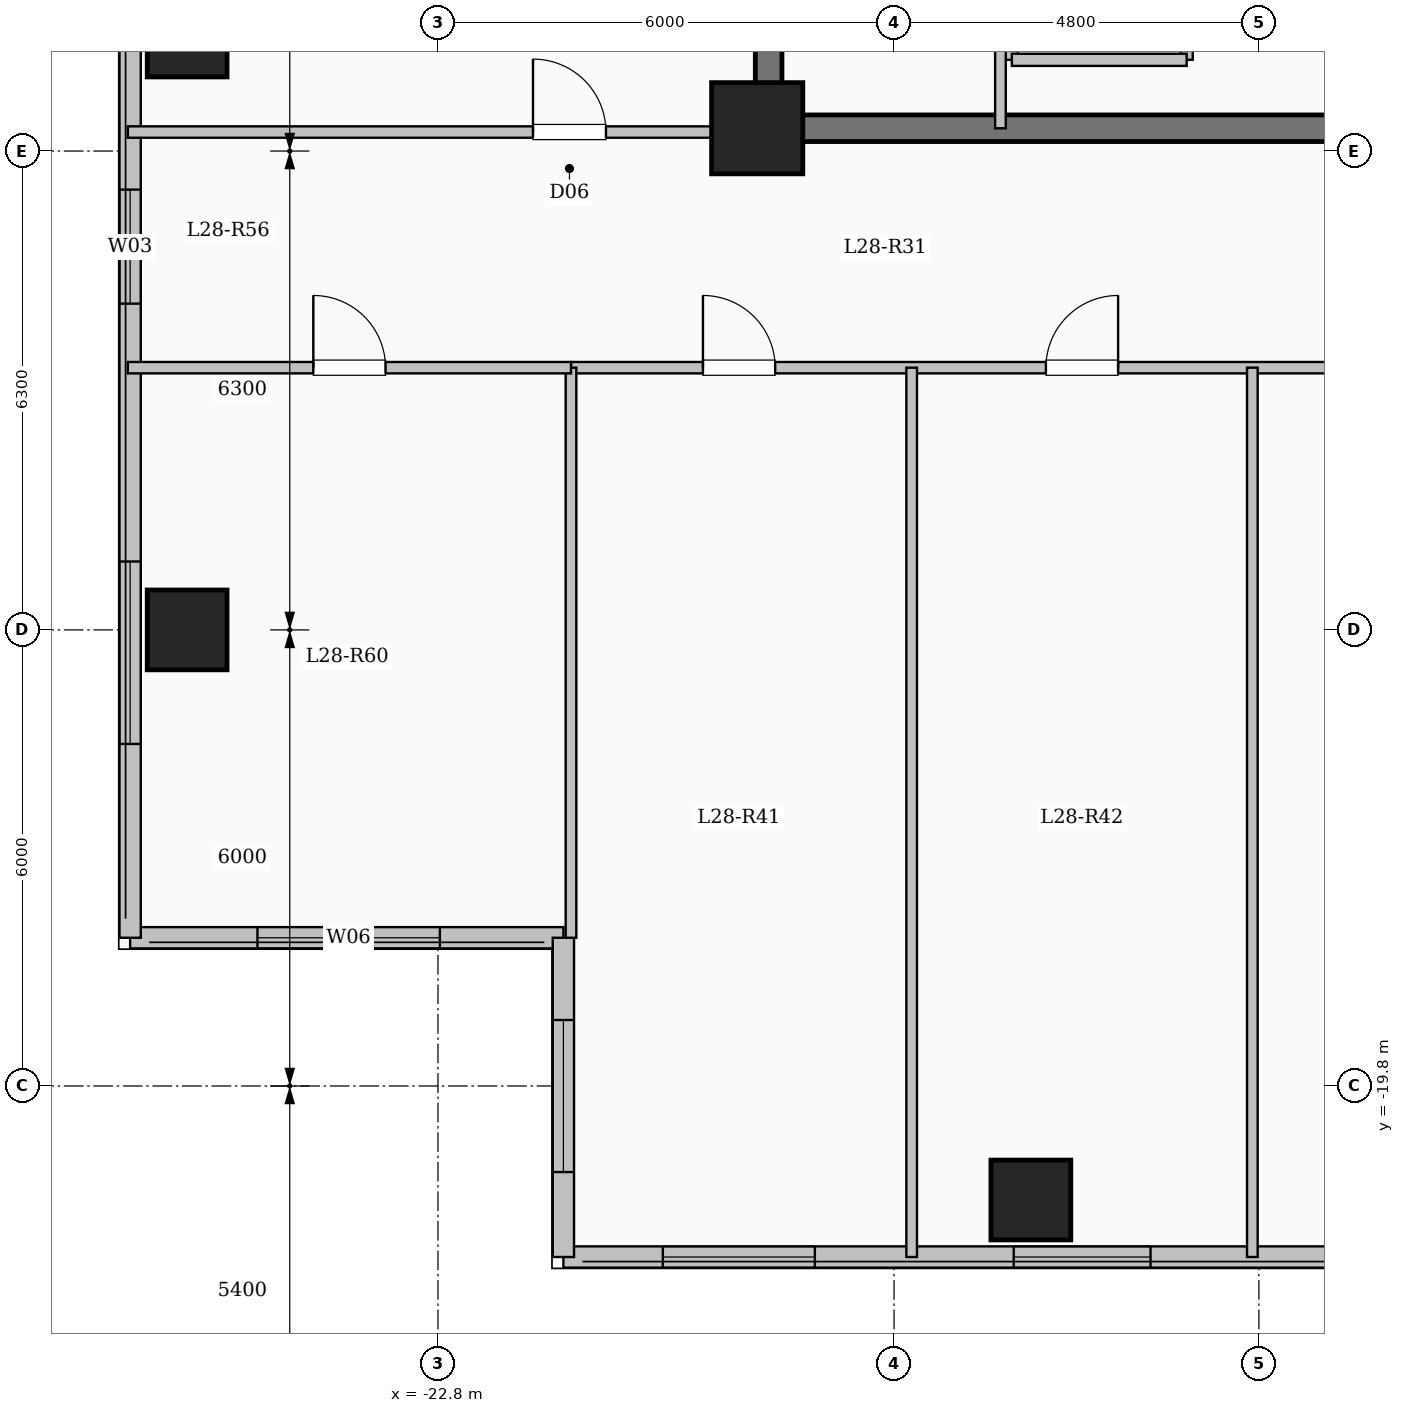
"""IFC4 building model, lengths in metres.
Left out: names, types, materials, properties, quantities, classifications, styles, units other than length and angle.
Written with IfcOpenShell. Run it as: python <this file> out.ifc"""

import sys

from ifc_helpers import new_model, si_unit, direction, frame, frame_2d, origin, origin_2d, place, context, subcontext, project, spatial, rectangle, extrude, element, fill, save


model = new_model("IFC4")
c1 = context("Model", 3, precision=1e-05, world=origin(), true_north=direction((0.0, 1.0)))
c2 = subcontext(c1, "Body", "Model", "MODEL_VIEW")
j1 = project(units=[si_unit("LENGTHUNIT", "METRE"), si_unit("PLANEANGLEUNIT", "RADIAN")], contexts=[c1])
p1 = place(None, origin())
s1 = spatial("IfcSite", under=j1, at=p1, CompositionType="ELEMENT")
p2 = place(p1, origin())
s2 = spatial("IfcBuilding", under=s1, at=p2, CompositionType="ELEMENT")
p3 = place(p2, frame((0.0, 0.0, 105.1)))
s3 = spatial("IfcBuildingStorey", under=s2, at=p3, CompositionType="ELEMENT", Elevation=105.1)
p4 = place(p3, frame((-18.6, -7.2, 0.0), z_axis=(0.0, 0.0, 1.0), x_axis=(1.0, 0.0, 0.0)))
e1 = element("IfcColumn", 1, at=p4, inside=s3, PredefinedType="COLUMN", context=c2, shape_type="SweptSolid", body=[
    extrude(rectangle(XDim=1.2, YDim=1.2, at=origin_2d()), origin(), (0.0, 0.0, 1.0), 3.35),
])
for number, where, z_axis, x_axis in (
    (2, (-15.0, -21.3, 0.0), (0.0, 0.0, 1.0), (1.0, 0.0, 0.0)),
    (3, (-26.1, -13.8, 0.0), (0.0, 0.0, 1.0), (1.0, 0.0, 0.0)),
    (4, (-26.1, -6.0, 0.0), (0.0, 0.0, 1.0), (1.0, 0.0, 0.0)),
):
    element("IfcColumn", number, at=place(p3, frame(where, z_axis=z_axis, x_axis=x_axis)), inside=s3, PredefinedType="COLUMN", context=c2, shape_type="SweptSolid", body=[
        extrude(rectangle(XDim=1.05, YDim=1.05, at=origin_2d()), origin(), (0.0, 0.0, 1.0), 3.35),
    ])
p5 = place(p3, frame((-21.15, -17.85, 0.0), z_axis=(0.0, 0.0, 1.0), x_axis=(-1.0, 0.0, 0.0)))
e5 = element("IfcWall", 5, at=p5, inside=s3, PredefinedType="SOLIDWALL", context=c2, shape_type="SweptSolid", body=[
    extrude(rectangle(XDim=5.7, YDim=0.28, at=frame_2d((2.85, 0.0))), origin(), (0.0, 0.0, 1.0), 3.1),
])
p6 = place(p5, frame((1.625, 0.0, 0.9)))
e6 = element("IfcOpeningElement", 6, at=p6, cuts=e5, PredefinedType="OPENING", context=c2, shape_type="SweptSolid", body=[
    extrude(rectangle(XDim=2.4, YDim=1.8, at=frame_2d((1.2, 0.9))), frame((0.0, 0.15, 0.0), z_axis=(0.0, -1.0, 0.0), x_axis=(1.0, 0.0, 0.0)), (0.0, 0.0, 1.0), 0.3),
])
p7 = place(p3, frame((-26.85, -17.85, 0.0), z_axis=(0.0, 0.0, 1.0), x_axis=(0.0, 1.0, 0.0)))
e7 = element("IfcWall", 7, at=p7, inside=s3, PredefinedType="SOLIDWALL", context=c2, shape_type="SweptSolid", body=[
    extrude(rectangle(XDim=35.7, YDim=0.28, at=frame_2d((17.85, 0.0))), origin(), (0.0, 0.0, 1.0), 3.1),
])
p8 = place(p7, frame((2.55, 0.0, 0.9)))
e8 = element("IfcOpeningElement", 8, at=p8, cuts=e7, PredefinedType="OPENING", context=c2, shape_type="SweptSolid", body=[
    extrude(rectangle(XDim=2.4, YDim=1.8, at=frame_2d((1.2, 0.9))), frame((0.0, 0.15, 0.0), z_axis=(0.0, -1.0, 0.0), x_axis=(1.0, 0.0, 0.0)), (0.0, 0.0, 1.0), 0.3),
])
p9 = place(p7, frame((8.343, 0.0, 0.9)))
e9 = element("IfcOpeningElement", 9, at=p9, cuts=e7, PredefinedType="OPENING", context=c2, shape_type="SweptSolid", body=[
    extrude(rectangle(XDim=1.5, YDim=1.65, at=frame_2d((0.75, 0.825))), frame((0.0, 0.15, 0.0), z_axis=(0.0, -1.0, 0.0), x_axis=(1.0, 0.0, 0.0)), (0.0, 0.0, 1.0), 0.3),
])
p10 = place(p7, frame((13.75, 0.0, 0.9)))
e10 = element("IfcOpeningElement", 10, at=p10, cuts=e7, PredefinedType="OPENING", context=c2, shape_type="SweptSolid", body=[
    extrude(rectangle(XDim=2.4, YDim=1.8, at=frame_2d((1.2, 0.9))), frame((0.0, 0.15, 0.0), z_axis=(0.0, -1.0, 0.0), x_axis=(1.0, 0.0, 0.0)), (0.0, 0.0, 1.0), 0.3),
])
p11 = place(p7, frame((20.175, 0.0, 0.9)))
e11 = element("IfcOpeningElement", 11, at=p11, cuts=e7, PredefinedType="OPENING", context=c2, shape_type="SweptSolid", body=[
    extrude(rectangle(XDim=1.8, YDim=1.65, at=frame_2d((0.9, 0.825))), frame((0.0, 0.15, 0.0), z_axis=(0.0, -1.0, 0.0), x_axis=(1.0, 0.0, 0.0)), (0.0, 0.0, 1.0), 0.3),
])
p12 = place(p7, frame((24.725, 0.0, 0.9)))
e12 = element("IfcOpeningElement", 12, at=p12, cuts=e7, PredefinedType="OPENING", context=c2, shape_type="SweptSolid", body=[
    extrude(rectangle(XDim=2.0, YDim=1.7, at=frame_2d((1.0, 0.85))), frame((0.0, 0.15, 0.0), z_axis=(0.0, -1.0, 0.0), x_axis=(1.0, 0.0, 0.0)), (0.0, 0.0, 1.0), 0.3),
])
p13 = place(p7, frame((28.975, 0.0, 0.95)))
e13 = element("IfcOpeningElement", 13, at=p13, cuts=e7, PredefinedType="OPENING", context=c2, shape_type="SweptSolid", body=[
    extrude(rectangle(XDim=1.0, YDim=1.5, at=frame_2d((0.5, 0.75))), frame((0.0, 0.15, 0.0), z_axis=(0.0, -1.0, 0.0), x_axis=(1.0, 0.0, 0.0)), (0.0, 0.0, 1.0), 0.3),
])
p14 = place(p7, frame((32.025, 0.0, 0.9)))
e14 = element("IfcOpeningElement", 14, at=p14, cuts=e7, PredefinedType="OPENING", context=c2, shape_type="SweptSolid", body=[
    extrude(rectangle(XDim=2.0, YDim=1.7, at=frame_2d((1.0, 0.85))), frame((0.0, 0.15, 0.0), z_axis=(0.0, -1.0, 0.0), x_axis=(1.0, 0.0, 0.0)), (0.0, 0.0, 1.0), 0.3),
])
p15 = place(p3, frame((-7.35, -22.05, 0.0), z_axis=(0.0, 0.0, 1.0), x_axis=(-1.0, 0.0, 0.0)))
e15 = element("IfcWall", 15, at=p15, inside=s3, PredefinedType="SOLIDWALL", context=c2, shape_type="SweptSolid", body=[
    extrude(rectangle(XDim=13.8, YDim=0.28, at=frame_2d((6.9, 0.0))), origin(), (0.0, 0.0, 1.0), 3.1),
])
p16 = place(p15, frame((0.147, 0.0, 0.95)))
e16 = element("IfcOpeningElement", 16, at=p16, cuts=e15, PredefinedType="OPENING", context=c2, shape_type="SweptSolid", body=[
    extrude(rectangle(XDim=0.85, YDim=1.5, at=frame_2d((0.425, 0.75))), frame((0.0, 0.15, 0.0), z_axis=(0.0, -1.0, 0.0), x_axis=(1.0, 0.0, 0.0)), (0.0, 0.0, 1.0), 0.3),
])
p17 = place(p15, frame((6.075, 0.0, 0.9)))
e17 = element("IfcOpeningElement", 17, at=p17, cuts=e15, PredefinedType="OPENING", context=c2, shape_type="SweptSolid", body=[
    extrude(rectangle(XDim=1.8, YDim=1.65, at=frame_2d((0.9, 0.825))), frame((0.0, 0.15, 0.0), z_axis=(0.0, -1.0, 0.0), x_axis=(1.0, 0.0, 0.0)), (0.0, 0.0, 1.0), 0.3),
])
p18 = place(p15, frame((10.492, 0.0, 0.9)))
e18 = element("IfcOpeningElement", 18, at=p18, cuts=e15, PredefinedType="OPENING", context=c2, shape_type="SweptSolid", body=[
    extrude(rectangle(XDim=2.0, YDim=1.7, at=frame_2d((1.0, 0.85))), frame((0.0, 0.15, 0.0), z_axis=(0.0, -1.0, 0.0), x_axis=(1.0, 0.0, 0.0)), (0.0, 0.0, 1.0), 0.3),
])
p19 = place(p3, frame((-21.15, -22.05, 0.0), z_axis=(0.0, 0.0, 1.0), x_axis=(0.0, 1.0, 0.0)))
e19 = element("IfcWall", 19, at=p19, inside=s3, PredefinedType="SOLIDWALL", context=c2, shape_type="SweptSolid", body=[
    extrude(rectangle(XDim=4.2, YDim=0.28, at=frame_2d((2.1, 0.0))), origin(), (0.0, 0.0, 1.0), 3.1),
])
p20 = place(p19, frame((1.118, 0.0, 0.9)))
e20 = element("IfcOpeningElement", 20, at=p20, cuts=e19, PredefinedType="OPENING", context=c2, shape_type="SweptSolid", body=[
    extrude(rectangle(XDim=2.0, YDim=1.7, at=frame_2d((1.0, 0.85))), frame((0.0, 0.15, 0.0), z_axis=(0.0, -1.0, 0.0), x_axis=(1.0, 0.0, 0.0)), (0.0, 0.0, 1.0), 0.3),
])
for number, where, z_axis, x_axis in (
    (21, (-15.25, -6.3, 0.0), (0.0, 0.0, 1.0), (0.0, 1.0, 0.0)),
    (22, (-12.95, -6.3, 0.0), (0.0, 0.0, 1.0), (0.0, 1.0, 0.0)),
):
    element("IfcWall", number, at=place(p3, frame(where, z_axis=z_axis, x_axis=x_axis)), inside=s3, PredefinedType="SOLIDWALL", context=c2, shape_type="SweptSolid", body=[
        extrude(rectangle(XDim=2.6, YDim=0.16, at=frame_2d((1.3, 0.0))), origin(), (0.0, 0.0, 1.0), 3.1),
    ])
p21 = place(p3, frame((-15.25, -6.3, 0.0), z_axis=(0.0, 0.0, 1.0), x_axis=(1.0, 0.0, 0.0)))
e23 = element("IfcWall", 23, at=p21, inside=s3, PredefinedType="SOLIDWALL", context=c2, shape_type="SweptSolid", body=[
    extrude(rectangle(XDim=2.3, YDim=0.16, at=frame_2d((1.15, 0.0))), origin(), (0.0, 0.0, 1.0), 3.1),
])
p22 = place(p3, frame((-18.45, -7.375, 0.0), z_axis=(0.0, 0.0, 1.0), x_axis=(0.0, 1.0, 0.0)))
e24 = element("IfcWall", 24, at=p22, inside=s3, PredefinedType="SHEAR", context=c2, shape_type="SweptSolid", body=[
    extrude(rectangle(XDim=14.05, YDim=0.35, at=frame_2d((7.025, 0.0))), origin(), (0.0, 0.0, 1.0), 3.35),
])
p23 = place(p3, frame((-18.625, -7.2, 0.0), z_axis=(0.0, 0.0, 1.0), x_axis=(1.0, 0.0, 0.0)))
e25 = element("IfcWall", 25, at=p23, inside=s3, PredefinedType="SHEAR", context=c2, shape_type="SweptSolid", body=[
    extrude(rectangle(XDim=8.55, YDim=0.35, at=frame_2d((4.275, 0.0))), origin(), (0.0, 0.0, 1.0), 3.35),
])
p24 = place(p3, frame((-15.4, -7.2, 0.0), z_axis=(0.0, 0.0, 1.0), x_axis=(0.0, 1.0, 0.0)))
e26 = element("IfcWall", 26, at=p24, inside=s3, PredefinedType="PARTITIONING", context=c2, shape_type="SweptSolid", body=[
    extrude(rectangle(XDim=10.45, YDim=0.14, at=frame_2d((5.225, 0.0))), origin(), (0.0, 0.0, 1.0), 3.1),
])
p25 = place(p24, frame((9.25, 0.0, 0.0)))
e27 = element("IfcOpeningElement", 27, at=p25, cuts=e26, PredefinedType="OPENING", context=c2, shape_type="SweptSolid", body=[
    extrude(rectangle(XDim=0.9, YDim=2.08, at=frame_2d((0.45, 1.04))), frame((0.0, 0.08, 0.0), z_axis=(0.0, -1.0, 0.0), x_axis=(1.0, 0.0, 0.0)), (0.0, 0.0, 1.0), 0.16),
])
p26 = place(p3, frame((-21.05, -10.35, 0.0), z_axis=(0.0, 0.0, 1.0), x_axis=(1.0, 0.0, 0.0)))
e28 = element("IfcWall", 28, at=p26, inside=s3, PredefinedType="PARTITIONING", context=c2, shape_type="SweptSolid", body=[
    extrude(rectangle(XDim=12.5, YDim=0.15, at=frame_2d((6.25, 0.0))), origin(), (0.0, 0.0, 1.0), 3.1),
])
p27 = place(p26, frame((1.736, 0.0, 0.0)))
e29 = element("IfcOpeningElement", 29, at=p27, cuts=e28, PredefinedType="OPENING", context=c2, shape_type="SweptSolid", body=[
    extrude(rectangle(XDim=0.95, YDim=2.15, at=frame_2d((0.475, 1.075))), frame((0.0, 0.085, 0.0), z_axis=(0.0, -1.0, 0.0), x_axis=(1.0, 0.0, 0.0)), (0.0, 0.0, 1.0), 0.17),
])
p28 = place(p26, frame((6.248, 0.0, 0.0)))
e30 = element("IfcOpeningElement", 30, at=p28, cuts=e28, PredefinedType="OPENING", context=c2, shape_type="SweptSolid", body=[
    extrude(rectangle(XDim=0.95, YDim=2.15, at=frame_2d((0.475, 1.075))), frame((0.0, 0.085, 0.0), z_axis=(0.0, -1.0, 0.0), x_axis=(1.0, 0.0, 0.0)), (0.0, 0.0, 1.0), 0.17),
])
p29 = place(p26, frame((10.262, 0.0, 0.0)))
e31 = element("IfcOpeningElement", 31, at=p29, cuts=e28, PredefinedType="OPENING", context=c2, shape_type="SweptSolid", body=[
    extrude(rectangle(XDim=0.95, YDim=2.15, at=frame_2d((0.475, 1.075))), frame((0.0, 0.085, 0.0), z_axis=(0.0, -1.0, 0.0), x_axis=(1.0, 0.0, 0.0)), (0.0, 0.0, 1.0), 0.17),
])
for number, where, z_axis, x_axis in (
    (32, (-16.568, -22.05, 0.0), (0.0, 0.0, 1.0), (0.0, 1.0, 0.0)),
    (33, (-12.086, -22.05, 0.0), (0.0, 0.0, 1.0), (0.0, 1.0, 0.0)),
):
    element("IfcWall", number, at=place(p3, frame(where, z_axis=z_axis, x_axis=x_axis)), inside=s3, PredefinedType="PARTITIONING", context=c2, shape_type="SweptSolid", body=[
        extrude(rectangle(XDim=11.7, YDim=0.14, at=frame_2d((5.85, 0.0))), origin(), (0.0, 0.0, 1.0), 3.1),
    ])
p30 = place(p3, frame((-26.88, -7.25, 0.0), z_axis=(0.0, 0.0, 1.0), x_axis=(1.0, 0.0, 0.0)))
e34 = element("IfcWall", 34, at=p30, inside=s3, PredefinedType="PARTITIONING", context=c2, shape_type="SweptSolid", body=[
    extrude(rectangle(XDim=8.43, YDim=0.15, at=frame_2d((4.215, 0.0))), origin(), (0.0, 0.0, 1.0), 3.1),
])
p31 = place(p30, frame((5.33, 0.0, 0.0)))
e35 = element("IfcOpeningElement", 35, at=p31, cuts=e34, PredefinedType="OPENING", context=c2, shape_type="SweptSolid", body=[
    extrude(rectangle(XDim=0.96, YDim=2.15, at=frame_2d((0.48, 1.075))), frame((0.0, 0.085, 0.0), z_axis=(0.0, -1.0, 0.0), x_axis=(1.0, 0.0, 0.0)), (0.0, 0.0, 1.0), 0.17),
])
p32 = place(p3, frame((-21.05, -17.85, 0.0), z_axis=(0.0, 0.0, 1.0), x_axis=(0.0, 1.0, 0.0)))
e36 = element("IfcWall", 36, at=p32, inside=s3, PredefinedType="PARTITIONING", context=c2, shape_type="SweptSolid", body=[
    extrude(rectangle(XDim=7.5, YDim=0.14, at=frame_2d((3.75, 0.0))), origin(), (0.0, 0.0, 1.0), 3.1),
])
p33 = place(p3, frame((-26.88, -10.35, 0.0), z_axis=(0.0, 0.0, 1.0), x_axis=(1.0, 0.0, 0.0)))
e37 = element("IfcWall", 37, at=p33, inside=s3, PredefinedType="PARTITIONING", context=c2, shape_type="SweptSolid", body=[
    extrude(rectangle(XDim=5.83, YDim=0.15, at=frame_2d((2.915, 0.0))), origin(), (0.0, 0.0, 1.0), 3.1),
])
p34 = place(p33, frame((2.44, 0.0, 0.0)))
e38 = element("IfcOpeningElement", 38, at=p34, cuts=e37, PredefinedType="OPENING", context=c2, shape_type="SweptSolid", body=[
    extrude(rectangle(XDim=0.95, YDim=2.15, at=frame_2d((0.475, 1.075))), frame((0.0, 0.085, 0.0), z_axis=(0.0, -1.0, 0.0), x_axis=(1.0, 0.0, 0.0)), (0.0, 0.0, 1.0), 0.17),
])
p35 = place(p6, origin())
e39 = element("IfcWindow", 39, at=p35, inside=s3, PartitioningType="SINGLE_PANEL", PredefinedType="WINDOW", context=c2, shape_type="SweptSolid", body=[
    extrude(rectangle(XDim=2.4, YDim=1.8, at=frame_2d((1.2, 0.9))), frame((0.0, 0.03, 0.0), z_axis=(0.0, -1.0, 0.0), x_axis=(1.0, 0.0, 0.0)), (0.0, 0.0, 1.0), 0.06),
])
fill(e6, e39)
p36 = place(p8, origin())
e40 = element("IfcWindow", 40, at=p36, inside=s3, PartitioningType="SINGLE_PANEL", PredefinedType="WINDOW", context=c2, shape_type="SweptSolid", body=[
    extrude(rectangle(XDim=2.4, YDim=1.8, at=frame_2d((1.2, 0.9))), frame((0.0, 0.03, 0.0), z_axis=(0.0, -1.0, 0.0), x_axis=(1.0, 0.0, 0.0)), (0.0, 0.0, 1.0), 0.06),
])
fill(e8, e40)
p37 = place(p9, origin())
e41 = element("IfcWindow", 41, at=p37, inside=s3, PartitioningType="SINGLE_PANEL", PredefinedType="WINDOW", context=c2, shape_type="SweptSolid", body=[
    extrude(rectangle(XDim=1.5, YDim=1.65, at=frame_2d((0.75, 0.825))), frame((0.0, 0.03, 0.0), z_axis=(0.0, -1.0, 0.0), x_axis=(1.0, 0.0, 0.0)), (0.0, 0.0, 1.0), 0.06),
])
fill(e9, e41)
p38 = place(p17, origin())
e42 = element("IfcWindow", 42, at=p38, inside=s3, PartitioningType="SINGLE_PANEL", PredefinedType="WINDOW", context=c2, shape_type="SweptSolid", body=[
    extrude(rectangle(XDim=1.8, YDim=1.65, at=frame_2d((0.9, 0.825))), frame((0.0, 0.03, 0.0), z_axis=(0.0, -1.0, 0.0), x_axis=(1.0, 0.0, 0.0)), (0.0, 0.0, 1.0), 0.06),
])
fill(e17, e42)
p39 = place(p18, origin())
e43 = element("IfcWindow", 43, at=p39, inside=s3, PartitioningType="SINGLE_PANEL", PredefinedType="WINDOW", context=c2, shape_type="SweptSolid", body=[
    extrude(rectangle(XDim=2.0, YDim=1.7, at=frame_2d((1.0, 0.85))), frame((0.0, 0.03, 0.0), z_axis=(0.0, -1.0, 0.0), x_axis=(1.0, 0.0, 0.0)), (0.0, 0.0, 1.0), 0.06),
])
fill(e18, e43)
p40 = place(p20, origin())
e44 = element("IfcWindow", 44, at=p40, inside=s3, PartitioningType="SINGLE_PANEL", PredefinedType="WINDOW", context=c2, shape_type="SweptSolid", body=[
    extrude(rectangle(XDim=2.0, YDim=1.7, at=frame_2d((1.0, 0.85))), frame((0.0, 0.03, 0.0), z_axis=(0.0, -1.0, 0.0), x_axis=(1.0, 0.0, 0.0)), (0.0, 0.0, 1.0), 0.06),
])
fill(e20, e44)
p41 = place(p27, origin())
e45 = element("IfcDoor", 45, at=p41, inside=s3, OperationType="SINGLE_SWING_LEFT", PredefinedType="DOOR", context=c2, shape_type="SweptSolid", body=[
    extrude(rectangle(XDim=0.95, YDim=2.15, at=frame_2d((0.475, 1.075))), frame((0.0, 0.025, 0.0), z_axis=(0.0, -1.0, 0.0), x_axis=(1.0, 0.0, 0.0)), (0.0, 0.0, 1.0), 0.05),
])
fill(e29, e45)
p42 = place(p28, origin())
e46 = element("IfcDoor", 46, at=p42, inside=s3, OperationType="SINGLE_SWING_RIGHT", PredefinedType="DOOR", context=c2, shape_type="SweptSolid", body=[
    extrude(rectangle(XDim=0.95, YDim=2.15, at=frame_2d((0.475, 1.075))), frame((0.0, 0.025, 0.0), z_axis=(0.0, -1.0, 0.0), x_axis=(1.0, 0.0, 0.0)), (0.0, 0.0, 1.0), 0.05),
])
fill(e30, e46)
p43 = place(p34, origin())
e47 = element("IfcDoor", 47, at=p43, inside=s3, OperationType="SINGLE_SWING_LEFT", PredefinedType="DOOR", context=c2, shape_type="SweptSolid", body=[
    extrude(rectangle(XDim=0.95, YDim=2.15, at=frame_2d((0.475, 1.075))), frame((0.0, 0.025, 0.0), z_axis=(0.0, -1.0, 0.0), x_axis=(1.0, 0.0, 0.0)), (0.0, 0.0, 1.0), 0.05),
])
fill(e38, e47)
p44 = place(p31, origin())
e48 = element("IfcDoor", 48, at=p44, inside=s3, OperationType="SINGLE_SWING_LEFT", PredefinedType="DOOR", context=c2, shape_type="SweptSolid", body=[
    extrude(rectangle(XDim=0.96, YDim=2.15, at=frame_2d((0.48, 1.075))), frame((0.0, 0.025, 0.0), z_axis=(0.0, -1.0, 0.0), x_axis=(1.0, 0.0, 0.0)), (0.0, 0.0, 1.0), 0.05),
])
fill(e35, e48)
save(model, sys.argv[1])
